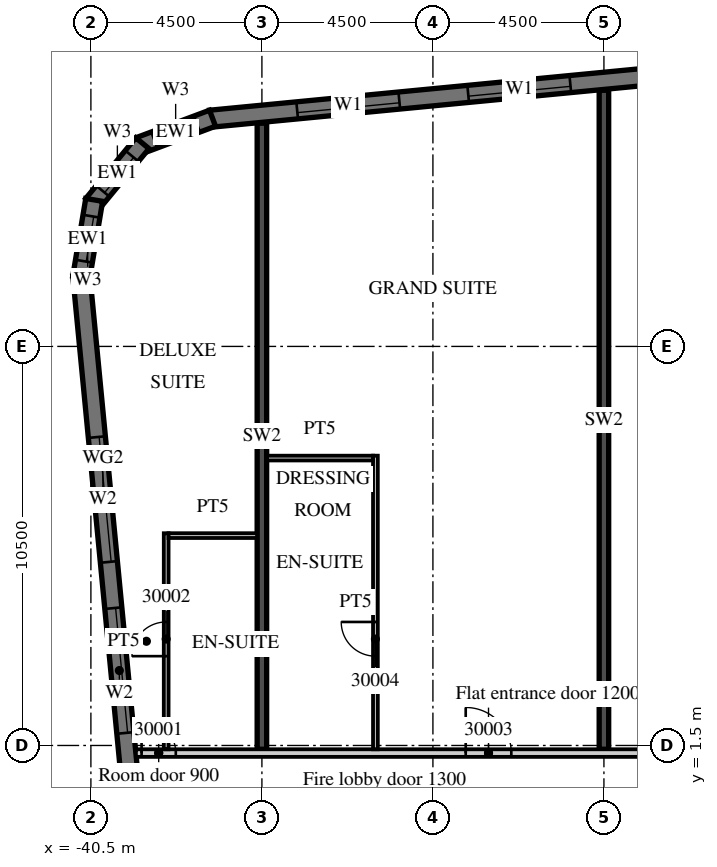
"""IFC4 building model, lengths in metres.
Left out: names, types, materials, properties, quantities, classifications, styles, units other than length and angle.
Written with IfcOpenShell. Run it as: python <this file> out.ifc"""

import sys

from ifc_helpers import new_model, si_unit, direction, frame, frame_2d, origin, place, context, subcontext, project, spatial, polyline, rectangle, outline, extrude, element, fill, save


model = new_model("IFC4")
c1 = context("Model", 3, precision=1e-05, world=origin(), true_north=direction((0.0, 1.0)))
c2 = subcontext(c1, "Body", "Model", "MODEL_VIEW")
j1 = project(units=[si_unit("LENGTHUNIT", "METRE"), si_unit("PLANEANGLEUNIT", "RADIAN")], contexts=[c1])
p1 = place(None, origin())
s1 = spatial("IfcSite", under=j1, at=p1, CompositionType="ELEMENT")
p2 = place(p1, origin())
s2 = spatial("IfcBuilding", under=s1, at=p2, CompositionType="ELEMENT")
p3 = place(p2, frame((0.0, 0.0, 133.9)))
s3 = spatial("IfcBuildingStorey", under=s2, at=p3, CompositionType="ELEMENT", Elevation=133.9)
p4 = place(p3, frame((-36.0, 1.4, 0.0), z_axis=(0.0, 0.0, 1.0), x_axis=(0.0, 1.0, 0.0)))
e1 = element("IfcWall", 1, at=p4, inside=s3, PredefinedType="SHEAR", context=c2, shape_type="SweptSolid", body=[
    extrude(rectangle(XDim=16.474, YDim=0.25, at=frame_2d((8.237, 0.0))), origin(), (0.0, 0.0, 1.0), 3.3),
])
p5 = place(p3, frame((-27.0, 1.4, 0.0), z_axis=(0.0, 0.0, 1.0), x_axis=(0.0, 1.0, 0.0)))
e2 = element("IfcWall", 2, at=p5, inside=s3, PredefinedType="SHEAR", context=c2, shape_type="SweptSolid", body=[
    extrude(rectangle(XDim=17.34, YDim=0.25, at=frame_2d((8.67, 0.0))), origin(), (0.0, 0.0, 1.0), 3.3),
])
p6 = place(p3, frame((-40.753, 13.872, 0.0), z_axis=(0.0, 0.0, 1.0), x_axis=(0.095843327381, -0.995396431878, 0.0)))
e3 = element("IfcWall", 3, at=p6, inside=s3, PredefinedType="SOLIDWALL", context=c2, shape_type="SweptSolid", body=[
    extrude(rectangle(XDim=35.0, YDim=0.45, at=frame_2d((17.5, 0.0))), origin(), (0.0, 0.0, 1.0), 3.02),
])
p7 = place(p6, frame((4.277, 0.0, 0.45)))
e4 = element("IfcOpeningElement", 4, at=p7, cuts=e3, PredefinedType="OPENING", context=c2, shape_type="SweptSolid", body=[
    extrude(rectangle(XDim=3.3, YDim=2.25, at=frame_2d((1.65, 1.125))), frame((0.0, 0.235, 0.0), z_axis=(0.0, -1.0, 0.0), x_axis=(1.0, 0.0, 0.0)), (0.0, 0.0, 1.0), 0.47),
])
p8 = place(p6, frame((8.798, 0.0, 0.45)))
e5 = element("IfcOpeningElement", 5, at=p8, cuts=e3, PredefinedType="OPENING", context=c2, shape_type="SweptSolid", body=[
    extrude(rectangle(XDim=3.3, YDim=2.25, at=frame_2d((1.65, 1.125))), frame((0.0, 0.235, 0.0), z_axis=(0.0, -1.0, 0.0), x_axis=(1.0, 0.0, 0.0)), (0.0, 0.0, 1.0), 0.47),
])
p9 = place(p3, frame((13.521, 22.89, 0.0), z_axis=(0.0, 0.0, 1.0), x_axis=(-0.995396445054, -0.095843190545, 0.0)))
e6 = element("IfcWall", 6, at=p9, inside=s3, PredefinedType="SOLIDWALL", context=c2, shape_type="SweptSolid", body=[
    extrude(rectangle(XDim=51.114, YDim=0.45, at=frame_2d((25.557, 0.0))), origin(), (0.0, 0.0, 1.0), 3.02),
])
p10 = place(p9, frame((0.91, 0.0, 0.45)))
e7 = element("IfcOpeningElement", 7, at=p10, cuts=e6, PredefinedType="OPENING", context=c2, shape_type="SweptSolid", body=[
    extrude(rectangle(XDim=2.7, YDim=2.25, at=frame_2d((1.35, 1.125))), frame((0.0, 0.235, 0.0), z_axis=(0.0, -1.0, 0.0), x_axis=(1.0, 0.0, 0.0)), (0.0, 0.0, 1.0), 0.47),
])
p11 = place(p9, frame((5.431, 0.0, 0.45)))
e8 = element("IfcOpeningElement", 8, at=p11, cuts=e6, PredefinedType="OPENING", context=c2, shape_type="SweptSolid", body=[
    extrude(rectangle(XDim=2.7, YDim=2.25, at=frame_2d((1.35, 1.125))), frame((0.0, 0.235, 0.0), z_axis=(0.0, -1.0, 0.0), x_axis=(1.0, 0.0, 0.0)), (0.0, 0.0, 1.0), 0.47),
])
p12 = place(p9, frame((9.952, 0.0, 0.45)))
e9 = element("IfcOpeningElement", 9, at=p12, cuts=e6, PredefinedType="OPENING", context=c2, shape_type="SweptSolid", body=[
    extrude(rectangle(XDim=2.7, YDim=2.25, at=frame_2d((1.35, 1.125))), frame((0.0, 0.235, 0.0), z_axis=(0.0, -1.0, 0.0), x_axis=(1.0, 0.0, 0.0)), (0.0, 0.0, 1.0), 0.47),
])
p13 = place(p9, frame((14.473, 0.0, 0.45)))
e10 = element("IfcOpeningElement", 10, at=p13, cuts=e6, PredefinedType="OPENING", context=c2, shape_type="SweptSolid", body=[
    extrude(rectangle(XDim=2.7, YDim=2.25, at=frame_2d((1.35, 1.125))), frame((0.0, 0.235, 0.0), z_axis=(0.0, -1.0, 0.0), x_axis=(1.0, 0.0, 0.0)), (0.0, 0.0, 1.0), 0.47),
])
p14 = place(p9, frame((18.994, 0.0, 0.45)))
e11 = element("IfcOpeningElement", 11, at=p14, cuts=e6, PredefinedType="OPENING", context=c2, shape_type="SweptSolid", body=[
    extrude(rectangle(XDim=2.7, YDim=2.25, at=frame_2d((1.35, 1.125))), frame((0.0, 0.235, 0.0), z_axis=(0.0, -1.0, 0.0), x_axis=(1.0, 0.0, 0.0)), (0.0, 0.0, 1.0), 0.47),
])
p15 = place(p9, frame((23.514, 0.0, 0.45)))
e12 = element("IfcOpeningElement", 12, at=p15, cuts=e6, PredefinedType="OPENING", context=c2, shape_type="SweptSolid", body=[
    extrude(rectangle(XDim=2.7, YDim=2.25, at=frame_2d((1.35, 1.125))), frame((0.0, 0.235, 0.0), z_axis=(0.0, -1.0, 0.0), x_axis=(1.0, 0.0, 0.0)), (0.0, 0.0, 1.0), 0.47),
])
p16 = place(p9, frame((28.035, 0.0, 0.45)))
e13 = element("IfcOpeningElement", 13, at=p16, cuts=e6, PredefinedType="OPENING", context=c2, shape_type="SweptSolid", body=[
    extrude(rectangle(XDim=2.7, YDim=2.25, at=frame_2d((1.35, 1.125))), frame((0.0, 0.235, 0.0), z_axis=(0.0, -1.0, 0.0), x_axis=(1.0, 0.0, 0.0)), (0.0, 0.0, 1.0), 0.47),
])
p17 = place(p9, frame((32.556, 0.0, 0.45)))
e14 = element("IfcOpeningElement", 14, at=p17, cuts=e6, PredefinedType="OPENING", context=c2, shape_type="SweptSolid", body=[
    extrude(rectangle(XDim=2.7, YDim=2.25, at=frame_2d((1.35, 1.125))), frame((0.0, 0.235, 0.0), z_axis=(0.0, -1.0, 0.0), x_axis=(1.0, 0.0, 0.0)), (0.0, 0.0, 1.0), 0.47),
])
p18 = place(p9, frame((37.077, 0.0, 0.45)))
e15 = element("IfcOpeningElement", 15, at=p18, cuts=e6, PredefinedType="OPENING", context=c2, shape_type="SweptSolid", body=[
    extrude(rectangle(XDim=2.7, YDim=2.25, at=frame_2d((1.35, 1.125))), frame((0.0, 0.235, 0.0), z_axis=(0.0, -1.0, 0.0), x_axis=(1.0, 0.0, 0.0)), (0.0, 0.0, 1.0), 0.47),
])
p19 = place(p9, frame((41.598, 0.0, 0.45)))
e16 = element("IfcOpeningElement", 16, at=p19, cuts=e6, PredefinedType="OPENING", context=c2, shape_type="SweptSolid", body=[
    extrude(rectangle(XDim=2.7, YDim=2.25, at=frame_2d((1.35, 1.125))), frame((0.0, 0.235, 0.0), z_axis=(0.0, -1.0, 0.0), x_axis=(1.0, 0.0, 0.0)), (0.0, 0.0, 1.0), 0.47),
])
p20 = place(p9, frame((46.118, 0.0, 0.45)))
e17 = element("IfcOpeningElement", 17, at=p20, cuts=e6, PredefinedType="OPENING", context=c2, shape_type="SweptSolid", body=[
    extrude(rectangle(XDim=2.7, YDim=2.25, at=frame_2d((1.35, 1.125))), frame((0.0, 0.235, 0.0), z_axis=(0.0, -1.0, 0.0), x_axis=(1.0, 0.0, 0.0)), (0.0, 0.0, 1.0), 0.47),
])
p21 = place(p3, frame((-37.3, 18.004, 0.0), z_axis=(0.0, 0.0, 1.0), x_axis=(-0.936677599948, -0.350192909346, 0.0)))
e18 = element("IfcWall", 18, at=p21, inside=s3, PredefinedType="SOLIDWALL", context=c2, shape_type="SweptSolid", body=[
    extrude(outline(polyline([(0.0, -0.225), (2.071, -0.225), (1.95, 0.225), (0.121, 0.225), (0.0, -0.225)])), origin(), (0.0, 0.0, 1.0), 3.02),
])
p22 = place(p21, frame((0.435, 0.0, 0.45)))
e19 = element("IfcOpeningElement", 19, at=p22, cuts=e18, PredefinedType="OPENING", context=c2, shape_type="SweptSolid", body=[
    extrude(rectangle(XDim=1.2, YDim=2.25, at=frame_2d((0.6, 1.125))), frame((0.0, 0.235, 0.0), z_axis=(0.0, -1.0, 0.0), x_axis=(1.0, 0.0, 0.0)), (0.0, 0.0, 1.0), 0.47),
])
p23 = place(p3, frame((-39.145, 17.347, 0.0), z_axis=(0.0, 0.0, 1.0), x_axis=(-0.636046112757, -0.771651049663, 0.0)))
e20 = element("IfcWall", 20, at=p23, inside=s3, PredefinedType="SOLIDWALL", context=c2, shape_type="SweptSolid", body=[
    extrude(outline(polyline([(0.0, -0.225), (2.071, -0.225), (1.95, 0.225), (0.121, 0.225), (0.0, -0.225)])), origin(), (0.0, 0.0, 1.0), 3.02),
])
p24 = place(p23, frame((0.435, 0.0, 0.45)))
e21 = element("IfcOpeningElement", 21, at=p24, cuts=e20, PredefinedType="OPENING", context=c2, shape_type="SweptSolid", body=[
    extrude(rectangle(XDim=1.2, YDim=2.25, at=frame_2d((0.6, 1.125))), frame((0.0, 0.235, 0.0), z_axis=(0.0, -1.0, 0.0), x_axis=(1.0, 0.0, 0.0)), (0.0, 0.0, 1.0), 0.47),
])
p25 = place(p3, frame((-40.413, 15.855, 0.0), z_axis=(0.0, 0.0, 1.0), x_axis=(-0.165068144653, -0.986282164302, 0.0)))
e22 = element("IfcWall", 22, at=p25, inside=s3, PredefinedType="SOLIDWALL", context=c2, shape_type="SweptSolid", body=[
    extrude(outline(polyline([(0.0, -0.225), (2.071, -0.225), (1.95, 0.225), (0.121, 0.225), (0.0, -0.225)])), origin(), (0.0, 0.0, 1.0), 3.02),
])
p26 = place(p25, frame((0.435, 0.0, 0.45)))
e23 = element("IfcOpeningElement", 23, at=p26, cuts=e22, PredefinedType="OPENING", context=c2, shape_type="SweptSolid", body=[
    extrude(rectangle(XDim=1.2, YDim=2.25, at=frame_2d((0.6, 1.125))), frame((0.0, 0.235, 0.0), z_axis=(0.0, -1.0, 0.0), x_axis=(1.0, 0.0, 0.0)), (0.0, 0.0, 1.0), 0.47),
])
p27 = place(p3, frame((-39.316, 1.3, 0.0), z_axis=(0.0, 0.0, 1.0), x_axis=(1.0, 0.0, 0.0)))
e24 = element("IfcWall", 24, at=p27, inside=s3, PredefinedType="PARTITIONING", context=c2, shape_type="SweptSolid", body=[
    extrude(rectangle(XDim=52.816, YDim=0.2, at=frame_2d((26.408, 0.0))), origin(), (0.0, 0.0, 1.0), 3.02),
])
p28 = place(p27, frame((0.15, 0.0, 0.0)))
e25 = element("IfcOpeningElement", 25, at=p28, cuts=e24, PredefinedType="OPENING", context=c2, shape_type="SweptSolid", body=[
    extrude(rectangle(XDim=0.9, YDim=2.1, at=frame_2d((0.45, 1.05))), frame((0.0, 0.11, 0.0), z_axis=(0.0, -1.0, 0.0), x_axis=(1.0, 0.0, 0.0)), (0.0, 0.0, 1.0), 0.22),
])
p29 = place(p27, frame((8.679, 0.0, 0.0)))
e26 = element("IfcOpeningElement", 26, at=p29, cuts=e24, PredefinedType="OPENING", context=c2, shape_type="SweptSolid", body=[
    extrude(rectangle(XDim=1.2, YDim=2.1, at=frame_2d((0.6, 1.05))), frame((0.0, 0.11, 0.0), z_axis=(0.0, -1.0, 0.0), x_axis=(1.0, 0.0, 0.0)), (0.0, 0.0, 1.0), 0.22),
])
p30 = place(p27, frame((14.754, 0.0, 0.0)))
e27 = element("IfcOpeningElement", 27, at=p30, cuts=e24, PredefinedType="OPENING", context=c2, shape_type="SweptSolid", body=[
    extrude(rectangle(XDim=1.2, YDim=2.1, at=frame_2d((0.6, 1.05))), frame((0.0, 0.11, 0.0), z_axis=(0.0, -1.0, 0.0), x_axis=(1.0, 0.0, 0.0)), (0.0, 0.0, 1.0), 0.22),
])
p31 = place(p27, frame((26.678, 0.0, 0.0)))
e28 = element("IfcOpeningElement", 28, at=p31, cuts=e24, PredefinedType="OPENING", context=c2, shape_type="SweptSolid", body=[
    extrude(rectangle(XDim=1.2, YDim=2.1, at=frame_2d((0.6, 1.05))), frame((0.0, 0.11, 0.0), z_axis=(0.0, -1.0, 0.0), x_axis=(1.0, 0.0, 0.0)), (0.0, 0.0, 1.0), 0.22),
])
p32 = place(p27, frame((33.266, 0.0, 0.0)))
e29 = element("IfcOpeningElement", 29, at=p32, cuts=e24, PredefinedType="OPENING", context=c2, shape_type="SweptSolid", body=[
    extrude(rectangle(XDim=1.0, YDim=2.1, at=frame_2d((0.5, 1.05))), frame((0.0, 0.11, 0.0), z_axis=(0.0, -1.0, 0.0), x_axis=(1.0, 0.0, 0.0)), (0.0, 0.0, 1.0), 0.22),
])
p33 = place(p27, frame((37.741, 0.0, 0.0)))
e30 = element("IfcOpeningElement", 30, at=p33, cuts=e24, PredefinedType="OPENING", context=c2, shape_type="SweptSolid", body=[
    extrude(rectangle(XDim=1.0, YDim=2.1, at=frame_2d((0.5, 1.05))), frame((0.0, 0.11, 0.0), z_axis=(0.0, -1.0, 0.0), x_axis=(1.0, 0.0, 0.0)), (0.0, 0.0, 1.0), 0.22),
])
p34 = place(p27, frame((41.754, 0.0, 0.0)))
e31 = element("IfcOpeningElement", 31, at=p34, cuts=e24, PredefinedType="OPENING", context=c2, shape_type="SweptSolid", body=[
    extrude(rectangle(XDim=1.2, YDim=2.1, at=frame_2d((0.6, 1.05))), frame((0.0, 0.11, 0.0), z_axis=(0.0, -1.0, 0.0), x_axis=(1.0, 0.0, 0.0)), (0.0, 0.0, 1.0), 0.22),
])
p35 = place(p27, frame((51.241, 0.0, 0.0)))
e32 = element("IfcOpeningElement", 32, at=p35, cuts=e24, PredefinedType="OPENING", context=c2, shape_type="SweptSolid", body=[
    extrude(rectangle(XDim=1.0, YDim=2.1, at=frame_2d((0.5, 1.05))), frame((0.0, 0.11, 0.0), z_axis=(0.0, -1.0, 0.0), x_axis=(1.0, 0.0, 0.0)), (0.0, 0.0, 1.0), 0.22),
])
p36 = place(p3, frame((-38.519, 1.4, 0.0), z_axis=(0.0, 0.0, 1.0), x_axis=(0.0, 1.0, 0.0)))
e33 = element("IfcWall", 33, at=p36, inside=s3, PredefinedType="PARTITIONING", context=c2, shape_type="SweptSolid", body=[
    extrude(rectangle(XDim=5.684, YDim=0.125, at=frame_2d((2.842, 0.0))), origin(), (0.0, 0.0, 1.0), 3.02),
])
p37 = place(p36, frame((2.45, 0.0, 0.0)))
e34 = element("IfcOpeningElement", 34, at=p37, cuts=e33, PredefinedType="OPENING", context=c2, shape_type="SweptSolid", body=[
    extrude(rectangle(XDim=0.9, YDim=2.1, at=frame_2d((0.45, 1.05))), frame((0.0, 0.073, 0.0), z_axis=(0.0, -1.0, 0.0), x_axis=(1.0, 0.0, 0.0)), (0.0, 0.0, 1.0), 0.145),
])
p38 = place(p3, frame((-38.457, 7.022, 0.0), z_axis=(0.0, 0.0, 1.0), x_axis=(1.0, 0.0, 0.0)))
e35 = element("IfcWall", 35, at=p38, inside=s3, PredefinedType="PARTITIONING", context=c2, shape_type="SweptSolid", body=[
    extrude(rectangle(XDim=2.332, YDim=0.125, at=frame_2d((1.166, 0.0))), origin(), (0.0, 0.0, 1.0), 3.02),
])
p39 = place(p3, frame((-33.013, 1.4, 0.0), z_axis=(0.0, 0.0, 1.0), x_axis=(0.0, 1.0, 0.0)))
e36 = element("IfcWall", 36, at=p39, inside=s3, PredefinedType="PARTITIONING", context=c2, shape_type="SweptSolid", body=[
    extrude(rectangle(XDim=7.725, YDim=0.125, at=frame_2d((3.863, 0.0))), origin(), (0.0, 0.0, 1.0), 3.02),
])
p40 = place(p39, frame((2.45, 0.0, 0.0)))
e37 = element("IfcOpeningElement", 37, at=p40, cuts=e36, PredefinedType="OPENING", context=c2, shape_type="SweptSolid", body=[
    extrude(rectangle(XDim=0.9, YDim=2.1, at=frame_2d((0.45, 1.05))), frame((0.0, 0.073, 0.0), z_axis=(0.0, -1.0, 0.0), x_axis=(1.0, 0.0, 0.0)), (0.0, 0.0, 1.0), 0.145),
])
p41 = place(p3, frame((-35.875, 9.062, 0.0), z_axis=(0.0, 0.0, 1.0), x_axis=(1.0, 0.0, 0.0)))
e38 = element("IfcWall", 38, at=p41, inside=s3, PredefinedType="PARTITIONING", context=c2, shape_type="SweptSolid", body=[
    extrude(rectangle(XDim=2.8, YDim=0.125, at=frame_2d((1.4, 0.0))), origin(), (0.0, 0.0, 1.0), 3.02),
])
p42 = place(p7, origin())
e39 = element("IfcWindow", 39, at=p42, inside=s3, PartitioningType="SINGLE_PANEL", PredefinedType="WINDOW", context=c2, shape_type="SweptSolid", body=[
    extrude(rectangle(XDim=3.3, YDim=2.25, at=frame_2d((1.65, 1.125))), frame((0.0, 0.09, 0.0), z_axis=(0.0, -1.0, 0.0), x_axis=(1.0, 0.0, 0.0)), (0.0, 0.0, 1.0), 0.06),
])
fill(e4, e39)
p43 = place(p8, origin())
e40 = element("IfcWindow", 40, at=p43, inside=s3, PartitioningType="SINGLE_PANEL", PredefinedType="WINDOW", context=c2, shape_type="SweptSolid", body=[
    extrude(rectangle(XDim=3.3, YDim=2.25, at=frame_2d((1.65, 1.125))), frame((0.0, 0.09, 0.0), z_axis=(0.0, -1.0, 0.0), x_axis=(1.0, 0.0, 0.0)), (0.0, 0.0, 1.0), 0.06),
])
fill(e5, e40)
p44 = place(p19, origin())
e41 = element("IfcWindow", 41, at=p44, inside=s3, PartitioningType="SINGLE_PANEL", PredefinedType="WINDOW", context=c2, shape_type="SweptSolid", body=[
    extrude(rectangle(XDim=2.7, YDim=2.25, at=frame_2d((1.35, 1.125))), frame((0.0, 0.09, 0.0), z_axis=(0.0, -1.0, 0.0), x_axis=(1.0, 0.0, 0.0)), (0.0, 0.0, 1.0), 0.06),
])
fill(e16, e41)
p45 = place(p20, origin())
e42 = element("IfcWindow", 42, at=p45, inside=s3, PartitioningType="SINGLE_PANEL", PredefinedType="WINDOW", context=c2, shape_type="SweptSolid", body=[
    extrude(rectangle(XDim=2.7, YDim=2.25, at=frame_2d((1.35, 1.125))), frame((0.0, 0.09, 0.0), z_axis=(0.0, -1.0, 0.0), x_axis=(1.0, 0.0, 0.0)), (0.0, 0.0, 1.0), 0.06),
])
fill(e17, e42)
p46 = place(p22, origin())
e43 = element("IfcWindow", 43, at=p46, inside=s3, PartitioningType="SINGLE_PANEL", PredefinedType="WINDOW", context=c2, shape_type="SweptSolid", body=[
    extrude(rectangle(XDim=1.2, YDim=2.25, at=frame_2d((0.6, 1.125))), frame((0.0, 0.09, 0.0), z_axis=(0.0, -1.0, 0.0), x_axis=(1.0, 0.0, 0.0)), (0.0, 0.0, 1.0), 0.06),
])
fill(e19, e43)
p47 = place(p24, origin())
e44 = element("IfcWindow", 44, at=p47, inside=s3, PartitioningType="SINGLE_PANEL", PredefinedType="WINDOW", context=c2, shape_type="SweptSolid", body=[
    extrude(rectangle(XDim=1.2, YDim=2.25, at=frame_2d((0.6, 1.125))), frame((0.0, 0.09, 0.0), z_axis=(0.0, -1.0, 0.0), x_axis=(1.0, 0.0, 0.0)), (0.0, 0.0, 1.0), 0.06),
])
fill(e21, e44)
p48 = place(p26, origin())
e45 = element("IfcWindow", 45, at=p48, inside=s3, PartitioningType="SINGLE_PANEL", PredefinedType="WINDOW", context=c2, shape_type="SweptSolid", body=[
    extrude(rectangle(XDim=1.2, YDim=2.25, at=frame_2d((0.6, 1.125))), frame((0.0, 0.09, 0.0), z_axis=(0.0, -1.0, 0.0), x_axis=(1.0, 0.0, 0.0)), (0.0, 0.0, 1.0), 0.06),
])
fill(e23, e45)
p49 = place(p28, origin())
e46 = element("IfcDoor", 46, at=p49, inside=s3, OperationType="SINGLE_SWING_LEFT", PredefinedType="DOOR", context=c2, shape_type="SweptSolid", body=[
    extrude(rectangle(XDim=0.9, YDim=2.1, at=frame_2d((0.45, 1.05))), frame((0.0, 0.025, 0.0), z_axis=(0.0, -1.0, 0.0), x_axis=(1.0, 0.0, 0.0)), (0.0, 0.0, 1.0), 0.05),
])
fill(e25, e46)
p50 = place(p37, origin())
e47 = element("IfcDoor", 47, at=p50, inside=s3, OperationType="SINGLE_SWING_LEFT", PredefinedType="DOOR", context=c2, shape_type="SweptSolid", body=[
    extrude(rectangle(XDim=0.9, YDim=2.1, at=frame_2d((0.45, 1.05))), frame((0.0, 0.025, 0.0), z_axis=(0.0, -1.0, 0.0), x_axis=(1.0, 0.0, 0.0)), (0.0, 0.0, 1.0), 0.05),
])
fill(e34, e47)
p51 = place(p29, origin())
e48 = element("IfcDoor", 48, at=p51, inside=s3, OperationType="SINGLE_SWING_LEFT", PredefinedType="DOOR", context=c2, shape_type="SweptSolid", body=[
    extrude(rectangle(XDim=1.2, YDim=2.1, at=frame_2d((0.6, 1.05))), frame((0.0, 0.025, 0.0), z_axis=(0.0, -1.0, 0.0), x_axis=(1.0, 0.0, 0.0)), (0.0, 0.0, 1.0), 0.05),
])
fill(e26, e48)
p52 = place(p40, origin())
e49 = element("IfcDoor", 49, at=p52, inside=s3, OperationType="SINGLE_SWING_RIGHT", PredefinedType="DOOR", context=c2, shape_type="SweptSolid", body=[
    extrude(rectangle(XDim=0.9, YDim=2.1, at=frame_2d((0.45, 1.05))), frame((0.0, 0.025, 0.0), z_axis=(0.0, -1.0, 0.0), x_axis=(1.0, 0.0, 0.0)), (0.0, 0.0, 1.0), 0.05),
])
fill(e37, e49)
save(model, sys.argv[1])
